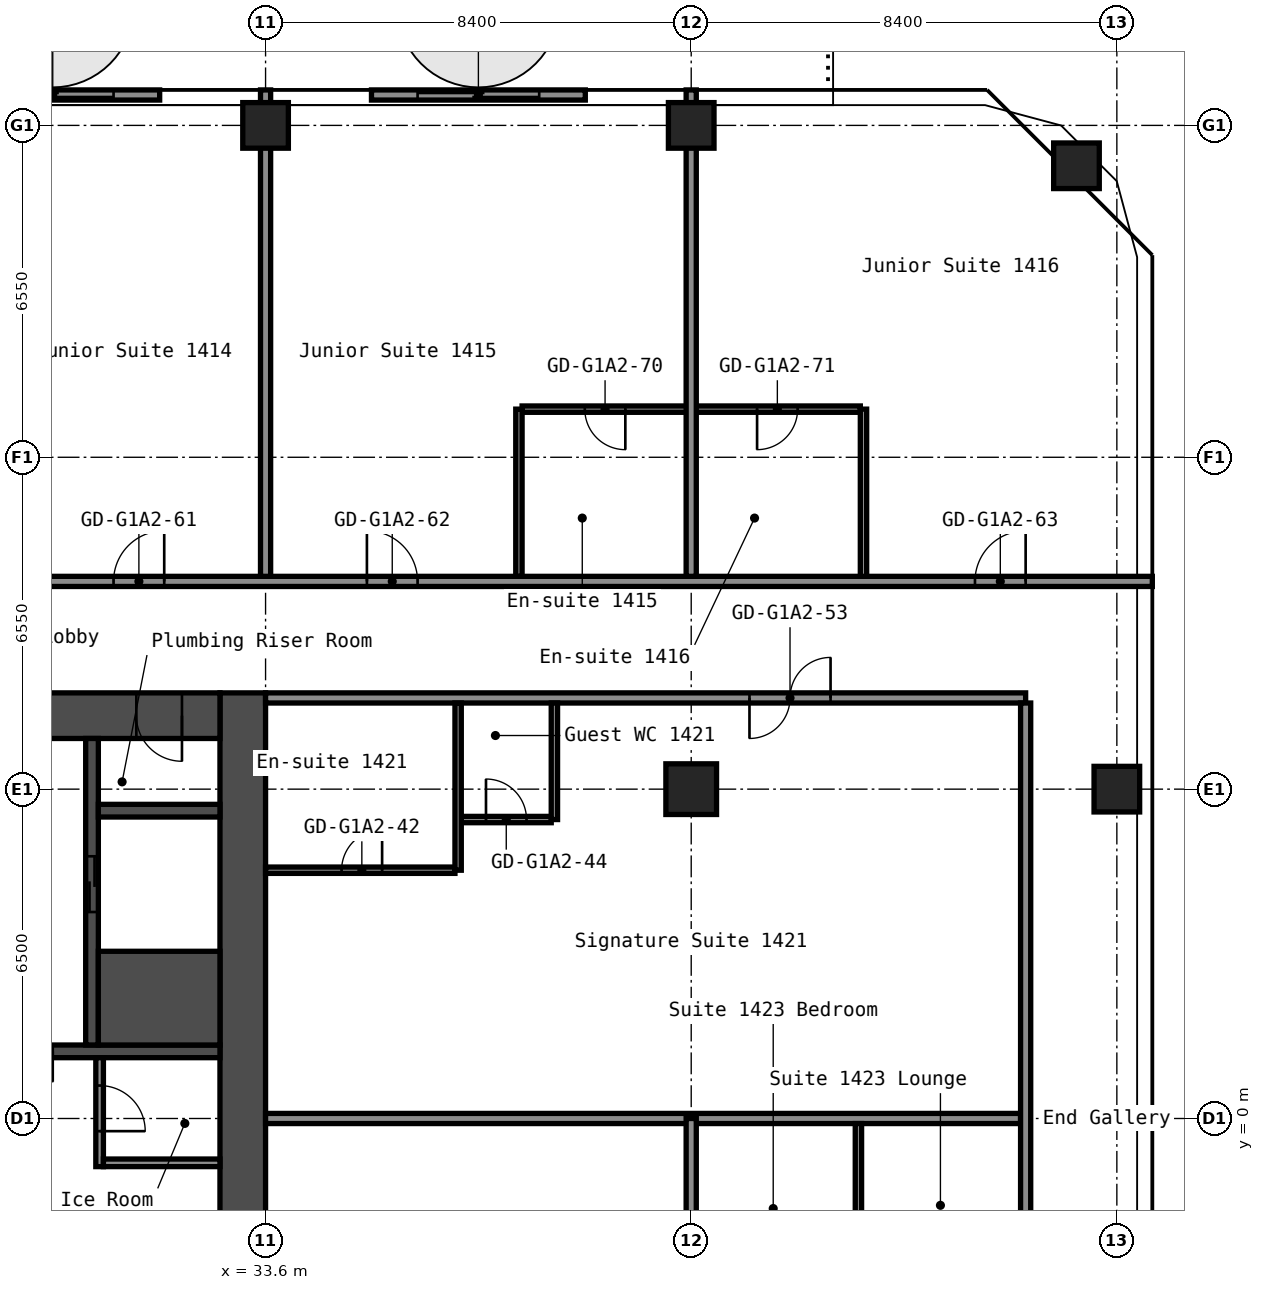
"""IFC4 building model, lengths in metres.
Left out: names, types, materials, properties, quantities, classifications, styles, units other than length and angle.
Written with IfcOpenShell. Run it as: python <this file> out.ifc"""

import sys

from ifc_helpers import new_model, si_unit, direction, frame, frame_2d, origin, origin_2d, place, context, subcontext, project, spatial, rectangle, hollow_rectangle, extrude, element, fill, save


model = new_model("IFC4")
c1 = context("Model", 3, precision=1e-05, world=origin(), true_north=direction((0.0, 1.0)))
c2 = subcontext(c1, "Body", "Model", "MODEL_VIEW")
j1 = project(units=[si_unit("LENGTHUNIT", "METRE"), si_unit("PLANEANGLEUNIT", "RADIAN")], contexts=[c1])
p1 = place(None, origin())
s1 = spatial("IfcSite", under=j1, at=p1, CompositionType="ELEMENT")
p2 = place(p1, origin())
s2 = spatial("IfcBuilding", under=s1, at=p2, CompositionType="ELEMENT")
p3 = place(p2, frame((0.0, 0.0, 51.8)))
s3 = spatial("IfcBuildingStorey", under=s2, at=p3, CompositionType="ELEMENT", Elevation=51.8)
p4 = place(p3, frame((33.6, 19.6, 0.0), z_axis=(0.0, 0.0, 1.0), x_axis=(1.0, 0.0, 0.0)))
e1 = element("IfcColumn", 1, at=p4, inside=s3, PredefinedType="COLUMN", context=c2, shape_type="SweptSolid", body=[
    extrude(hollow_rectangle(XDim=0.9, YDim=0.9, WallThickness=0.036, at=origin_2d()), origin(), (0.0, 0.0, 1.0), 2.8),
])
p5 = place(p3, frame((42.0, 6.5, 0.0), z_axis=(0.0, 0.0, 1.0), x_axis=(1.0, 0.0, 0.0)))
e2 = element("IfcColumn", 2, at=p5, inside=s3, PredefinedType="COLUMN", context=c2, shape_type="SweptSolid", body=[
    extrude(hollow_rectangle(XDim=1.0, YDim=1.0, WallThickness=0.04, at=origin_2d()), origin(), (0.0, 0.0, 1.0), 2.8),
])
for number, where, z_axis, x_axis in (
    (3, (42.0, 19.6, 0.0), (0.0, 0.0, 1.0), (1.0, 0.0, 0.0)),
    (4, (50.4, 6.5, 0.0), (0.0, 0.0, 1.0), (1.0, 0.0, 0.0)),
    (5, (49.603, 18.803, 0.0), (0.0, 0.0, 1.0), (1.0, 0.0, 0.0)),
):
    element("IfcColumn", number, at=place(p3, frame(where, z_axis=z_axis, x_axis=x_axis)), inside=s3, PredefinedType="COLUMN", context=c2, shape_type="SweptSolid", body=[
        extrude(hollow_rectangle(XDim=0.9, YDim=0.9, WallThickness=0.036, at=origin_2d()), origin(), (0.0, 0.0, 1.0), 2.8),
    ])
p6 = place(p3, frame((33.15, -8.4, 0.0), z_axis=(0.0, 0.0, 1.0), x_axis=(0.0, 1.0, 0.0)))
e6 = element("IfcWall", 6, at=p6, inside=s3, PredefinedType="SHEAR", context=c2, shape_type="SweptSolid", body=[
    extrude(rectangle(XDim=16.8, YDim=0.9, at=frame_2d((8.4, 0.0))), origin(), (0.0, 0.0, 1.0), 2.8),
])
p7 = place(p3, frame((17.7, 7.95, 0.0), z_axis=(0.0, 0.0, 1.0), x_axis=(1.0, 0.0, 0.0)))
e7 = element("IfcWall", 7, at=p7, inside=s3, PredefinedType="SHEAR", context=c2, shape_type="SweptSolid", body=[
    extrude(rectangle(XDim=15.0, YDim=0.9, at=frame_2d((7.5, 0.0))), origin(), (0.0, 0.0, 1.0), 2.8),
])
p8 = place(p7, frame((10.4, 0.0, 0.0)))
e8 = element("IfcOpeningElement", 8, at=p8, cuts=e7, PredefinedType="OPENING", context=c2, shape_type="SweptSolid", body=[
    extrude(rectangle(XDim=1.2, YDim=2.1, at=frame_2d((0.6, 1.05))), frame((0.0, 0.46, 0.0), z_axis=(0.0, -1.0, 0.0), x_axis=(1.0, 0.0, 0.0)), (0.0, 0.0, 1.0), 0.92),
])
p9 = place(p7, frame((13.35, 0.0, 0.0)))
e9 = element("IfcOpeningElement", 9, at=p9, cuts=e7, PredefinedType="OPENING", context=c2, shape_type="SweptSolid", body=[
    extrude(rectangle(XDim=0.9, YDim=2.1, at=frame_2d((0.45, 1.05))), frame((0.0, 0.46, 0.0), z_axis=(0.0, -1.0, 0.0), x_axis=(1.0, 0.0, 0.0)), (0.0, 0.0, 1.0), 0.92),
])
p10 = place(p3, frame((27.65, 1.325, 0.0), z_axis=(0.0, 0.0, 1.0), x_axis=(1.0, 0.0, 0.0)))
e10 = element("IfcWall", 10, at=p10, inside=s3, PredefinedType="SHEAR", context=c2, shape_type="SweptSolid", body=[
    extrude(rectangle(XDim=5.05, YDim=0.25, at=frame_2d((2.525, 0.0))), origin(), (0.0, 0.0, 1.0), 2.8),
])
p11 = place(p10, frame((0.55, 0.0, 0.0)))
e11 = element("IfcOpeningElement", 11, at=p11, cuts=e10, PredefinedType="OPENING", context=c2, shape_type="SweptSolid", body=[
    extrude(rectangle(XDim=1.2, YDim=2.1, at=frame_2d((0.6, 1.05))), frame((0.0, 0.135, 0.0), z_axis=(0.0, -1.0, 0.0), x_axis=(1.0, 0.0, 0.0)), (0.0, 0.0, 1.0), 0.27),
])
p12 = place(p3, frame((30.175, 1.45, 0.0), z_axis=(0.0, 0.0, 1.0), x_axis=(0.0, 1.0, 0.0)))
e12 = element("IfcWall", 12, at=p12, inside=s3, PredefinedType="SHEAR", context=c2, shape_type="SweptSolid", body=[
    extrude(rectangle(XDim=6.05, YDim=0.25, at=frame_2d((3.025, 0.0))), origin(), (0.0, 0.0, 1.0), 2.8),
])
p13 = place(p12, frame((2.625, 0.0, 0.0)))
e13 = element("IfcOpeningElement", 13, at=p13, cuts=e12, PredefinedType="OPENING", context=c2, shape_type="SweptSolid", body=[
    extrude(rectangle(XDim=1.1, YDim=2.1, at=frame_2d((0.55, 1.05))), frame((0.0, 0.135, 0.0), z_axis=(0.0, -1.0, 0.0), x_axis=(1.0, 0.0, 0.0)), (0.0, 0.0, 1.0), 0.27),
])
p14 = place(p3, frame((30.3, 2.375, 0.0), z_axis=(0.0, 0.0, 1.0), x_axis=(1.0, 0.0, 0.0)))
e14 = element("IfcWall", 14, at=p14, inside=s3, PredefinedType="SHEAR", context=c2, shape_type="SweptSolid", body=[
    extrude(rectangle(XDim=2.4, YDim=1.85, at=frame_2d((1.2, 0.0))), origin(), (0.0, 0.0, 1.0), 2.8),
])
p15 = place(p3, frame((30.3, 6.075, 0.0), z_axis=(0.0, 0.0, 1.0), x_axis=(1.0, 0.0, 0.0)))
e15 = element("IfcWall", 15, at=p15, inside=s3, PredefinedType="SHEAR", context=c2, shape_type="SweptSolid", body=[
    extrude(rectangle(XDim=2.4, YDim=0.25, at=frame_2d((1.2, 0.0))), origin(), (0.0, 0.0, 1.0), 2.8),
])
p16 = place(p3, frame((30.325, -0.95, 0.0), z_axis=(0.0, 0.0, 1.0), x_axis=(0.0, 1.0, 0.0)))
e16 = element("IfcWall", 16, at=p16, inside=s3, PredefinedType="PARTITIONING", context=c2, shape_type="SweptSolid", body=[
    extrude(rectangle(XDim=2.15, YDim=0.15, at=frame_2d((1.075, 0.0))), origin(), (0.0, 0.0, 1.0), 2.8),
])
p17 = place(p16, frame((0.7, 0.0, 0.0)))
e17 = element("IfcOpeningElement", 17, at=p17, cuts=e16, PredefinedType="OPENING", context=c2, shape_type="SweptSolid", body=[
    extrude(rectangle(XDim=0.9, YDim=2.1, at=frame_2d((0.45, 1.05))), frame((0.0, 0.085, 0.0), z_axis=(0.0, -1.0, 0.0), x_axis=(1.0, 0.0, 0.0)), (0.0, 0.0, 1.0), 0.17),
])
p18 = place(p3, frame((30.4, -0.875, 0.0), z_axis=(0.0, 0.0, 1.0), x_axis=(1.0, 0.0, 0.0)))
e18 = element("IfcWall", 18, at=p18, inside=s3, PredefinedType="PARTITIONING", context=c2, shape_type="SweptSolid", body=[
    extrude(rectangle(XDim=2.3, YDim=0.15, at=frame_2d((1.15, 0.0))), origin(), (0.0, 0.0, 1.0), 2.8),
])
p19 = place(p3, frame((33.6, 0.0, 0.0), z_axis=(0.0, 0.0, 1.0), x_axis=(1.0, 0.0, 0.0)))
e19 = element("IfcWall", 19, at=p19, inside=s3, PredefinedType="PARTITIONING", context=c2, shape_type="SweptSolid", body=[
    extrude(rectangle(XDim=14.9, YDim=0.2, at=frame_2d((7.45, 0.0))), origin(), (0.0, 0.0, 1.0), 2.8),
])
p20 = place(p3, frame((33.6, 4.9, 0.0), z_axis=(0.0, 0.0, 1.0), x_axis=(1.0, 0.0, 0.0)))
e20 = element("IfcWall", 20, at=p20, inside=s3, PredefinedType="PARTITIONING", context=c2, shape_type="SweptSolid", body=[
    extrude(rectangle(XDim=3.737, YDim=0.125, at=frame_2d((1.869, 0.0))), origin(), (0.0, 0.0, 1.0), 2.8),
])
p21 = place(p20, frame((1.5, 0.0, 0.0)))
e21 = element("IfcOpeningElement", 21, at=p21, cuts=e20, PredefinedType="OPENING", context=c2, shape_type="SweptSolid", body=[
    extrude(rectangle(XDim=0.8, YDim=2.1, at=frame_2d((0.4, 1.05))), frame((0.0, 0.073, 0.0), z_axis=(0.0, -1.0, 0.0), x_axis=(1.0, 0.0, 0.0)), (0.0, 0.0, 1.0), 0.145),
])
p22 = place(p3, frame((37.462, 5.9, 0.0), z_axis=(0.0, 0.0, 1.0), x_axis=(1.0, 0.0, 0.0)))
e22 = element("IfcWall", 22, at=p22, inside=s3, PredefinedType="PARTITIONING", context=c2, shape_type="SweptSolid", body=[
    extrude(rectangle(XDim=1.775, YDim=0.125, at=frame_2d((0.888, 0.0))), origin(), (0.0, 0.0, 1.0), 2.8),
])
p23 = place(p22, frame((0.488, 0.0, 0.0)))
e23 = element("IfcOpeningElement", 23, at=p23, cuts=e22, PredefinedType="OPENING", context=c2, shape_type="SweptSolid", body=[
    extrude(rectangle(XDim=0.8, YDim=2.1, at=frame_2d((0.4, 1.05))), frame((0.0, 0.073, 0.0), z_axis=(0.0, -1.0, 0.0), x_axis=(1.0, 0.0, 0.0)), (0.0, 0.0, 1.0), 0.145),
])
p24 = place(p3, frame((33.6, 8.3, 0.0), z_axis=(0.0, 0.0, 1.0), x_axis=(1.0, 0.0, 0.0)))
e24 = element("IfcWall", 24, at=p24, inside=s3, PredefinedType="PARTITIONING", context=c2, shape_type="SweptSolid", body=[
    extrude(rectangle(XDim=15.0, YDim=0.2, at=frame_2d((7.5, 0.0))), origin(), (0.0, 0.0, 1.0), 2.8),
])
p25 = place(p24, frame((9.55, 0.0, 0.0)))
e25 = element("IfcOpeningElement", 25, at=p25, cuts=e24, PredefinedType="OPENING", context=c2, shape_type="SweptSolid", body=[
    extrude(rectangle(XDim=1.6, YDim=2.1, at=frame_2d((0.8, 1.05))), frame((0.0, 0.11, 0.0), z_axis=(0.0, -1.0, 0.0), x_axis=(1.0, 0.0, 0.0)), (0.0, 0.0, 1.0), 0.22),
])
p26 = place(p3, frame((16.8, 10.6, 0.0), z_axis=(0.0, 0.0, 1.0), x_axis=(1.0, 0.0, 0.0)))
e26 = element("IfcWall", 26, at=p26, inside=s3, PredefinedType="PARTITIONING", context=c2, shape_type="SweptSolid", body=[
    extrude(rectangle(XDim=34.3, YDim=0.2, at=frame_2d((17.15, 0.0))), origin(), (0.0, 0.0, 1.0), 2.8),
])
p27 = place(p26, frame((5.4, 0.0, 0.0)))
e27 = element("IfcOpeningElement", 27, at=p27, cuts=e26, PredefinedType="OPENING", context=c2, shape_type="SweptSolid", body=[
    extrude(rectangle(XDim=1.0, YDim=2.1, at=frame_2d((0.5, 1.05))), frame((0.0, 0.11, 0.0), z_axis=(0.0, -1.0, 0.0), x_axis=(1.0, 0.0, 0.0)), (0.0, 0.0, 1.0), 0.22),
])
p28 = place(p26, frame((13.8, 0.0, 0.0)))
e28 = element("IfcOpeningElement", 28, at=p28, cuts=e26, PredefinedType="OPENING", context=c2, shape_type="SweptSolid", body=[
    extrude(rectangle(XDim=1.0, YDim=2.1, at=frame_2d((0.5, 1.05))), frame((0.0, 0.11, 0.0), z_axis=(0.0, -1.0, 0.0), x_axis=(1.0, 0.0, 0.0)), (0.0, 0.0, 1.0), 0.22),
])
p29 = place(p26, frame((18.8, 0.0, 0.0)))
e29 = element("IfcOpeningElement", 29, at=p29, cuts=e26, PredefinedType="OPENING", context=c2, shape_type="SweptSolid", body=[
    extrude(rectangle(XDim=1.0, YDim=2.1, at=frame_2d((0.5, 1.05))), frame((0.0, 0.11, 0.0), z_axis=(0.0, -1.0, 0.0), x_axis=(1.0, 0.0, 0.0)), (0.0, 0.0, 1.0), 0.22),
])
p30 = place(p26, frame((30.8, 0.0, 0.0)))
e30 = element("IfcOpeningElement", 30, at=p30, cuts=e26, PredefinedType="OPENING", context=c2, shape_type="SweptSolid", body=[
    extrude(rectangle(XDim=1.0, YDim=2.1, at=frame_2d((0.5, 1.05))), frame((0.0, 0.11, 0.0), z_axis=(0.0, -1.0, 0.0), x_axis=(1.0, 0.0, 0.0)), (0.0, 0.0, 1.0), 0.22),
])
p31 = place(p3, frame((38.663, 14.0, 0.0), z_axis=(0.0, 0.0, 1.0), x_axis=(1.0, 0.0, 0.0)))
e31 = element("IfcWall", 31, at=p31, inside=s3, PredefinedType="PARTITIONING", context=c2, shape_type="SweptSolid", body=[
    extrude(rectangle(XDim=6.675, YDim=0.125, at=frame_2d((3.337, 0.0))), origin(), (0.0, 0.0, 1.0), 2.8),
])
p32 = place(p31, frame((1.238, 0.0, 0.0)))
e32 = element("IfcOpeningElement", 32, at=p32, cuts=e31, PredefinedType="OPENING", context=c2, shape_type="SweptSolid", body=[
    extrude(rectangle(XDim=0.8, YDim=2.1, at=frame_2d((0.4, 1.05))), frame((0.0, 0.073, 0.0), z_axis=(0.0, -1.0, 0.0), x_axis=(1.0, 0.0, 0.0)), (0.0, 0.0, 1.0), 0.145),
])
p33 = place(p31, frame((4.637, 0.0, 0.0)))
e33 = element("IfcOpeningElement", 33, at=p33, cuts=e31, PredefinedType="OPENING", context=c2, shape_type="SweptSolid", body=[
    extrude(rectangle(XDim=0.8, YDim=2.1, at=frame_2d((0.4, 1.05))), frame((0.0, 0.073, 0.0), z_axis=(0.0, -1.0, 0.0), x_axis=(1.0, 0.0, 0.0)), (0.0, 0.0, 1.0), 0.145),
])
p34 = place(p3, frame((33.6, 10.7, 0.0), z_axis=(0.0, 0.0, 1.0), x_axis=(0.0, 1.0, 0.0)))
e34 = element("IfcWall", 34, at=p34, inside=s3, PredefinedType="PARTITIONING", context=c2, shape_type="SweptSolid", body=[
    extrude(rectangle(XDim=9.6, YDim=0.2, at=frame_2d((4.8, 0.0))), origin(), (0.0, 0.0, 1.0), 2.8),
])
for number, where, z_axis, x_axis in (
    (35, (37.4, 4.9, 0.0), (0.0, 0.0, 1.0), (0.0, 1.0, 0.0)),
    (36, (38.6, 10.7, 0.0), (0.0, 0.0, 1.0), (0.0, 1.0, 0.0)),
):
    element("IfcWall", number, at=place(p3, frame(where, z_axis=z_axis, x_axis=x_axis)), inside=s3, PredefinedType="PARTITIONING", context=c2, shape_type="SweptSolid", body=[
        extrude(rectangle(XDim=3.3, YDim=0.125, at=frame_2d((1.65, 0.0))), origin(), (0.0, 0.0, 1.0), 2.8),
    ])
p35 = place(p3, frame((39.3, 5.9, 0.0), z_axis=(0.0, 0.0, 1.0), x_axis=(0.0, 1.0, 0.0)))
e37 = element("IfcWall", 37, at=p35, inside=s3, PredefinedType="PARTITIONING", context=c2, shape_type="SweptSolid", body=[
    extrude(rectangle(XDim=2.3, YDim=0.125, at=frame_2d((1.15, 0.0))), origin(), (0.0, 0.0, 1.0), 2.8),
])
p36 = place(p3, frame((42.0, -8.2, 0.0), z_axis=(0.0, 0.0, 1.0), x_axis=(0.0, 1.0, 0.0)))
e38 = element("IfcWall", 38, at=p36, inside=s3, PredefinedType="PARTITIONING", context=c2, shape_type="SweptSolid", body=[
    extrude(rectangle(XDim=8.2, YDim=0.2, at=frame_2d((4.1, 0.0))), origin(), (0.0, 0.0, 1.0), 2.8),
])
p37 = place(p3, frame((42.0, 10.7, 0.0), z_axis=(0.0, 0.0, 1.0), x_axis=(0.0, 1.0, 0.0)))
e39 = element("IfcWall", 39, at=p37, inside=s3, PredefinedType="PARTITIONING", context=c2, shape_type="SweptSolid", body=[
    extrude(rectangle(XDim=9.6, YDim=0.2, at=frame_2d((4.8, 0.0))), origin(), (0.0, 0.0, 1.0), 2.8),
])
p38 = place(p3, frame((45.3, -8.2, 0.0), z_axis=(0.0, 0.0, 1.0), x_axis=(0.0, 1.0, 0.0)))
e40 = element("IfcWall", 40, at=p38, inside=s3, PredefinedType="PARTITIONING", context=c2, shape_type="SweptSolid", body=[
    extrude(rectangle(XDim=8.1, YDim=0.125, at=frame_2d((4.05, 0.0))), origin(), (0.0, 0.0, 1.0), 2.8),
])
p39 = place(p38, frame((4.05, 0.0, 0.0)))
e41 = element("IfcOpeningElement", 41, at=p39, cuts=e40, PredefinedType="OPENING", context=c2, shape_type="SweptSolid", body=[
    extrude(rectangle(XDim=0.9, YDim=2.1, at=frame_2d((0.45, 1.05))), frame((0.0, 0.073, 0.0), z_axis=(0.0, -1.0, 0.0), x_axis=(1.0, 0.0, 0.0)), (0.0, 0.0, 1.0), 0.145),
])
p40 = place(p3, frame((45.4, 10.7, 0.0), z_axis=(0.0, 0.0, 1.0), x_axis=(0.0, 1.0, 0.0)))
e42 = element("IfcWall", 42, at=p40, inside=s3, PredefinedType="PARTITIONING", context=c2, shape_type="SweptSolid", body=[
    extrude(rectangle(XDim=3.3, YDim=0.125, at=frame_2d((1.65, 0.0))), origin(), (0.0, 0.0, 1.0), 2.8),
])
p41 = place(p3, frame((48.6, -8.2, 0.0), z_axis=(0.0, 0.0, 1.0), x_axis=(0.0, 1.0, 0.0)))
e43 = element("IfcWall", 43, at=p41, inside=s3, PredefinedType="PARTITIONING", context=c2, shape_type="SweptSolid", body=[
    extrude(rectangle(XDim=16.4, YDim=0.2, at=frame_2d((8.2, 0.0))), origin(), (0.0, 0.0, 1.0), 2.8),
])
p42 = place(p3, frame((39.91, 20.2, 0.0), z_axis=(0.0, 0.0, 1.0), x_axis=(-1.0, 0.0, 0.0)))
p43 = place(p42, frame((0.91, 0.0, 0.0)))
p44 = place(p43, frame((2.4, 0.0, 0.0), z_axis=(0.0, 0.0, 1.0), x_axis=(-1.0, 0.0, 0.0)))
e44 = element("IfcDoor", 44, at=p44, inside=s3, OperationType="SLIDING_TO_LEFT", PredefinedType="DOOR", context=c2, shape_type="SweptSolid", body=[
    extrude(rectangle(XDim=2.4, YDim=2.2, at=frame_2d((1.2, 1.1))), frame((0.0, 0.025, 0.0), z_axis=(0.0, -1.0, 0.0), x_axis=(1.0, 0.0, 0.0)), (0.0, 0.0, 1.0), 0.05),
])
p45 = place(p3, frame((31.51, 20.2, 0.0), z_axis=(0.0, 0.0, 1.0), x_axis=(-1.0, 0.0, 0.0)))
p46 = place(p45, frame((0.91, 0.0, 0.0)))
p47 = place(p46, frame((2.4, 0.0, 0.0), z_axis=(0.0, 0.0, 1.0), x_axis=(-1.0, 0.0, 0.0)))
e45 = element("IfcDoor", 45, at=p47, inside=s3, OperationType="SLIDING_TO_LEFT", PredefinedType="DOOR", context=c2, shape_type="SweptSolid", body=[
    extrude(rectangle(XDim=2.4, YDim=2.2, at=frame_2d((1.2, 1.1))), frame((0.0, 0.025, 0.0), z_axis=(0.0, -1.0, 0.0), x_axis=(1.0, 0.0, 0.0)), (0.0, 0.0, 1.0), 0.05),
])
p48 = place(p9, origin())
e46 = element("IfcDoor", 46, at=p48, inside=s3, OperationType="SINGLE_SWING_RIGHT", PredefinedType="DOOR", context=c2, shape_type="SweptSolid", body=[
    extrude(rectangle(XDim=0.9, YDim=2.1, at=frame_2d((0.45, 1.05))), frame((0.0, 0.025, 0.0), z_axis=(0.0, -1.0, 0.0), x_axis=(1.0, 0.0, 0.0)), (0.0, 0.0, 1.0), 0.05),
])
fill(e9, e46)
p49 = place(p17, origin())
e47 = element("IfcDoor", 47, at=p49, inside=s3, OperationType="SINGLE_SWING_LEFT", PredefinedType="DOOR", context=c2, shape_type="SweptSolid", body=[
    extrude(rectangle(XDim=0.9, YDim=2.1, at=frame_2d((0.45, 1.05))), frame((0.0, 0.025, 0.0), z_axis=(0.0, -1.0, 0.0), x_axis=(1.0, 0.0, 0.0)), (0.0, 0.0, 1.0), 0.05),
])
fill(e17, e47)
p50 = place(p13, origin())
e48 = element("IfcDoor", 48, at=p50, inside=s3, OperationType="DOUBLE_DOOR_SLIDING", PredefinedType="DOOR", context=c2, shape_type="SweptSolid", body=[
    extrude(rectangle(XDim=1.1, YDim=2.1, at=frame_2d((0.55, 1.05))), frame((0.0, 0.025, 0.0), z_axis=(0.0, -1.0, 0.0), x_axis=(1.0, 0.0, 0.0)), (0.0, 0.0, 1.0), 0.05),
])
fill(e13, e48)
p51 = place(p21, origin())
e49 = element("IfcDoor", 49, at=p51, inside=s3, OperationType="SINGLE_SWING_LEFT", PredefinedType="DOOR", context=c2, shape_type="SweptSolid", body=[
    extrude(rectangle(XDim=0.8, YDim=2.1, at=frame_2d((0.4, 1.05))), frame((0.0, 0.025, 0.0), z_axis=(0.0, -1.0, 0.0), x_axis=(1.0, 0.0, 0.0)), (0.0, 0.0, 1.0), 0.05),
])
fill(e21, e49)
p52 = place(p23, origin())
e50 = element("IfcDoor", 50, at=p52, inside=s3, OperationType="SINGLE_SWING_RIGHT", PredefinedType="DOOR", context=c2, shape_type="SweptSolid", body=[
    extrude(rectangle(XDim=0.8, YDim=2.1, at=frame_2d((0.4, 1.05))), frame((0.0, 0.025, 0.0), z_axis=(0.0, -1.0, 0.0), x_axis=(1.0, 0.0, 0.0)), (0.0, 0.0, 1.0), 0.05),
])
fill(e23, e50)
p53 = place(p25, origin())
e51 = element("IfcDoor", 51, at=p53, inside=s3, OperationType="DOUBLE_DOOR_SINGLE_SWING", PredefinedType="DOOR", context=c2, shape_type="SweptSolid", body=[
    extrude(rectangle(XDim=1.6, YDim=2.1, at=frame_2d((0.8, 1.05))), frame((0.0, 0.025, 0.0), z_axis=(0.0, -1.0, 0.0), x_axis=(1.0, 0.0, 0.0)), (0.0, 0.0, 1.0), 0.05),
])
fill(e25, e51)
p54 = place(p28, origin())
e52 = element("IfcDoor", 52, at=p54, inside=s3, OperationType="SINGLE_SWING_LEFT", PredefinedType="DOOR", context=c2, shape_type="SweptSolid", body=[
    extrude(rectangle(XDim=1.0, YDim=2.1, at=frame_2d((0.5, 1.05))), frame((0.0, 0.025, 0.0), z_axis=(0.0, -1.0, 0.0), x_axis=(1.0, 0.0, 0.0)), (0.0, 0.0, 1.0), 0.05),
])
fill(e28, e52)
p55 = place(p29, origin())
e53 = element("IfcDoor", 53, at=p55, inside=s3, OperationType="SINGLE_SWING_RIGHT", PredefinedType="DOOR", context=c2, shape_type="SweptSolid", body=[
    extrude(rectangle(XDim=1.0, YDim=2.1, at=frame_2d((0.5, 1.05))), frame((0.0, 0.025, 0.0), z_axis=(0.0, -1.0, 0.0), x_axis=(1.0, 0.0, 0.0)), (0.0, 0.0, 1.0), 0.05),
])
fill(e29, e53)
p56 = place(p30, origin())
e54 = element("IfcDoor", 54, at=p56, inside=s3, OperationType="SINGLE_SWING_LEFT", PredefinedType="DOOR", context=c2, shape_type="SweptSolid", body=[
    extrude(rectangle(XDim=1.0, YDim=2.1, at=frame_2d((0.5, 1.05))), frame((0.0, 0.025, 0.0), z_axis=(0.0, -1.0, 0.0), x_axis=(1.0, 0.0, 0.0)), (0.0, 0.0, 1.0), 0.05),
])
fill(e30, e54)
p57 = place(p32, origin())
e55 = element("IfcDoor", 55, at=p57, inside=s3, OperationType="SINGLE_SWING_RIGHT", PredefinedType="DOOR", context=c2, shape_type="SweptSolid", body=[
    extrude(rectangle(XDim=0.8, YDim=2.1, at=frame_2d((0.4, 1.05))), frame((0.0, 0.025, 0.0), z_axis=(0.0, -1.0, 0.0), x_axis=(1.0, 0.0, 0.0)), (0.0, 0.0, 1.0), 0.05),
])
fill(e32, e55)
p58 = place(p33, origin())
e56 = element("IfcDoor", 56, at=p58, inside=s3, OperationType="SINGLE_SWING_LEFT", PredefinedType="DOOR", context=c2, shape_type="SweptSolid", body=[
    extrude(rectangle(XDim=0.8, YDim=2.1, at=frame_2d((0.4, 1.05))), frame((0.0, 0.025, 0.0), z_axis=(0.0, -1.0, 0.0), x_axis=(1.0, 0.0, 0.0)), (0.0, 0.0, 1.0), 0.05),
])
fill(e33, e56)
save(model, sys.argv[1])
